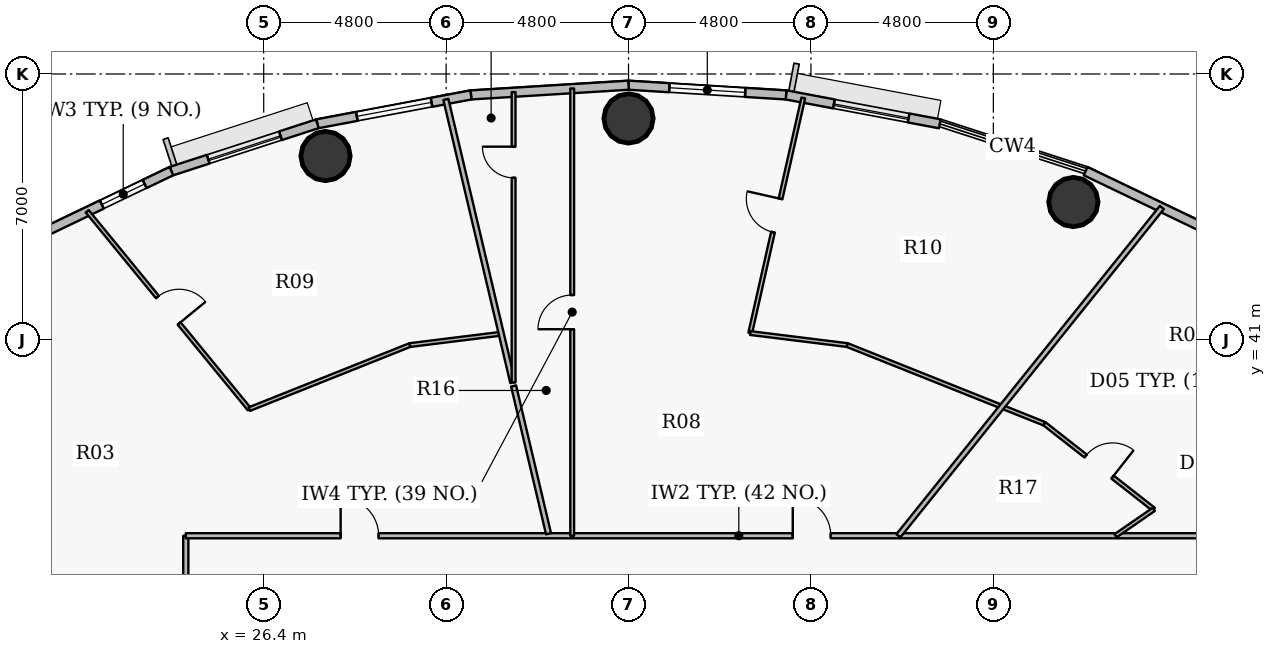
"""IFC4 building model, lengths in metres.
Left out: names, types, materials, properties, quantities, classifications, styles, units other than length and angle.
Written with IfcOpenShell. Run it as: python <this file> out.ifc"""

import sys

from ifc_helpers import new_model, si_unit, direction, frame, frame_2d, origin, origin_2d, place, context, subcontext, project, spatial, rectangle, hollow_circle, extrude, source, transform, mapped, element, fill, save


model = new_model("IFC4")
c1 = context("Model", 3, precision=1e-05, world=origin(), true_north=direction((0.0, 1.0)))
c2 = subcontext(c1, "Body", "Model", "MODEL_VIEW")
j1 = project(units=[si_unit("LENGTHUNIT", "METRE"), si_unit("PLANEANGLEUNIT", "RADIAN")], contexts=[c1])
p1 = place(None, origin())
s1 = spatial("IfcSite", under=j1, at=p1, CompositionType="ELEMENT")
p2 = place(p1, origin())
s2 = spatial("IfcBuilding", under=s1, at=p2, CompositionType="ELEMENT")
p3 = place(p2, frame((0.0, 0.0, 159.9)))
s3 = spatial("IfcBuildingStorey", under=s2, at=p3, CompositionType="ELEMENT", Elevation=159.9)
for number, where, z_axis, x_axis in (
    (1, (47.706, 44.631, 0.0), (0.0, 0.0, 1.0), (1.0, 0.0, 0.0)),
    (2, (36.0, 46.83, 0.0), (0.0, 0.0, 1.0), (1.0, 0.0, 0.0)),
    (3, (28.027, 45.841, 0.0), (0.0, 0.0, 1.0), (1.0, 0.0, 0.0)),
):
    element("IfcColumn", number, at=place(p3, frame(where, z_axis=z_axis, x_axis=x_axis)), inside=s3, PredefinedType="COLUMN", context=c2, shape_type="SweptSolid", body=[
        extrude(hollow_circle(Radius=0.65, WallThickness=0.04, at=origin_2d()), origin(), (0.0, 0.0, 1.0), 3.75),
    ])
p4 = place(p3, frame((48.03, 45.444, 0.0), z_axis=(0.0, 0.0, 1.0), x_axis=(0.901564733809, -0.432644231155, 0.0)))
e4 = element("IfcWall", 4, at=p4, inside=s3, PredefinedType="SOLIDWALL", context=c2, shape_type="SweptSolid", body=[
    extrude(rectangle(XDim=3.93, YDim=0.24, at=frame_2d((1.965, 0.0))), origin(), (0.0, 0.0, 1.0), 3.5),
])
p5 = place(p3, frame((40.146, 47.449, 0.0), z_axis=(0.0, 0.0, 1.0), x_axis=(0.982788108205, -0.184736391573, 0.0)))
e5 = element("IfcWall", 5, at=p5, inside=s3, PredefinedType="SOLIDWALL", context=c2, shape_type="SweptSolid", body=[
    extrude(rectangle(XDim=4.114, YDim=0.24, at=frame_2d((2.057, 0.0))), origin(), (0.0, 0.0, 1.0), 3.5),
])
p6 = place(p5, frame((1.281, 0.0, 0.9)))
e6 = element("IfcOpeningElement", 6, at=p6, cuts=e5, PredefinedType="OPENING", context=c2, shape_type="SweptSolid", body=[
    extrude(rectangle(XDim=2.0, YDim=1.75, at=origin_2d()), frame((1.0, 0.13, 0.875), z_axis=(0.0, -1.0, 0.0), x_axis=(1.0, 0.0, 0.0)), (0.0, 0.0, 1.0), 0.26),
])
p7 = place(p3, frame((36.0, 47.705, 0.0), z_axis=(0.0, 0.0, 1.0), x_axis=(0.998104600619, -0.061540281305, 0.0)))
e7 = element("IfcWall", 7, at=p7, inside=s3, PredefinedType="SOLIDWALL", context=c2, shape_type="SweptSolid", body=[
    extrude(rectangle(XDim=4.154, YDim=0.24, at=frame_2d((2.077, 0.0))), origin(), (0.0, 0.0, 1.0), 3.5),
])
p8 = place(p7, frame((1.077, 0.0, 0.9)))
e8 = element("IfcOpeningElement", 8, at=p8, cuts=e7, PredefinedType="OPENING", context=c2, shape_type="SweptSolid", body=[
    extrude(rectangle(XDim=2.0, YDim=1.75, at=origin_2d()), frame((1.0, 0.13, 0.875), z_axis=(0.0, -1.0, 0.0), x_axis=(1.0, 0.0, 0.0)), (0.0, 0.0, 1.0), 0.26),
])
p9 = place(p3, frame((31.854, 47.449, 0.0), z_axis=(0.0, 0.0, 1.0), x_axis=(0.998104600619, 0.061540281305, 0.0)))
e9 = element("IfcWall", 9, at=p9, inside=s3, PredefinedType="SOLIDWALL", context=c2, shape_type="SweptSolid", body=[
    extrude(rectangle(XDim=4.154, YDim=0.24, at=frame_2d((2.077, 0.0))), origin(), (0.0, 0.0, 1.0), 3.5),
])
p10 = place(p3, frame((27.811, 46.689, 0.0), z_axis=(0.0, 0.0, 1.0), x_axis=(0.982788108205, 0.184736391573, 0.0)))
e10 = element("IfcWall", 10, at=p10, inside=s3, PredefinedType="SOLIDWALL", context=c2, shape_type="SweptSolid", body=[
    extrude(rectangle(XDim=4.114, YDim=0.24, at=frame_2d((2.057, 0.0))), origin(), (0.0, 0.0, 1.0), 3.5),
])
p11 = place(p10, frame((1.057, 0.0, 0.9)))
e11 = element("IfcOpeningElement", 11, at=p11, cuts=e10, PredefinedType="OPENING", context=c2, shape_type="SweptSolid", body=[
    extrude(rectangle(XDim=2.0, YDim=1.75, at=origin_2d()), frame((1.0, 0.13, 0.875), z_axis=(0.0, -1.0, 0.0), x_axis=(1.0, 0.0, 0.0)), (0.0, 0.0, 1.0), 0.26),
])
p12 = place(p3, frame((23.97, 45.444, 0.0), z_axis=(0.0, 0.0, 1.0), x_axis=(0.951209870236, 0.30854462038, 0.0)))
e12 = element("IfcWall", 12, at=p12, inside=s3, PredefinedType="SOLIDWALL", context=c2, shape_type="SweptSolid", body=[
    extrude(rectangle(XDim=4.038, YDim=0.24, at=frame_2d((2.019, 0.0))), origin(), (0.0, 0.0, 1.0), 3.5),
])
p13 = place(p12, frame((1.019, 0.0, 0.9)))
e13 = element("IfcOpeningElement", 13, at=p13, cuts=e12, PredefinedType="OPENING", context=c2, shape_type="SweptSolid", body=[
    extrude(rectangle(XDim=2.0, YDim=1.75, at=origin_2d()), frame((1.0, 0.13, 0.875), z_axis=(0.0, -1.0, 0.0), x_axis=(1.0, 0.0, 0.0)), (0.0, 0.0, 1.0), 0.26),
])
p14 = place(p3, frame((20.427, 43.743, 0.0), z_axis=(0.0, 0.0, 1.0), x_axis=(0.901564733809, 0.432644231155, 0.0)))
e14 = element("IfcWall", 14, at=p14, inside=s3, PredefinedType="SOLIDWALL", context=c2, shape_type="SweptSolid", body=[
    extrude(rectangle(XDim=3.93, YDim=0.24, at=frame_2d((1.965, 0.0))), origin(), (0.0, 0.0, 1.0), 3.5),
])
p15 = place(p14, frame((1.9, 0.0, 0.9)))
e15 = element("IfcOpeningElement", 15, at=p15, cuts=e14, PredefinedType="OPENING", context=c2, shape_type="SweptSolid", body=[
    extrude(rectangle(XDim=1.25, YDim=1.65, at=origin_2d()), frame((0.625, 0.13, 0.825), z_axis=(0.0, -1.0, 0.0), x_axis=(1.0, 0.0, 0.0)), (0.0, 0.0, 1.0), 0.26),
])
p16 = place(p3, frame((13.229, 37.45, 0.0), z_axis=(0.0, 0.0, 1.0), x_axis=(0.908867611309, -0.417084721746, 0.0)))
e16 = element("IfcWall", 16, at=p16, inside=s3, PredefinedType="PARTITIONING", context=c2, shape_type="SweptSolid", body=[
    extrude(rectangle(XDim=12.237, YDim=0.135, at=frame_2d((6.118, 0.0))), origin(), (0.0, 0.0, 1.0), 2.935),
])
p17 = place(p3, frame((21.756, 44.387, 0.0), z_axis=(0.0, 0.0, 1.0), x_axis=(0.633727642201, -0.773556252325, 0.0)))
e17 = element("IfcWall", 17, at=p17, inside=s3, PredefinedType="PARTITIONING", context=c2, shape_type="SweptSolid", body=[
    extrude(rectangle(XDim=6.729, YDim=0.1, at=frame_2d((3.365, 0.0))), origin(), (0.0, 0.0, 1.0), 2.935),
])
p18 = place(p17, frame((2.915, 0.0, 0.0)))
e18 = element("IfcOpeningElement", 18, at=p18, cuts=e17, PredefinedType="OPENING", context=c2, shape_type="SweptSolid", body=[
    extrude(rectangle(XDim=0.9, YDim=2.1, at=origin_2d()), frame((0.45, 0.06, 1.05), z_axis=(0.0, -1.0, 0.0), x_axis=(1.0, 0.0, 0.0)), (0.0, 0.0, 1.0), 0.12),
])
p19 = place(p3, frame((24.35, 27.95, 0.0), z_axis=(0.0, 0.0, 1.0), x_axis=(0.0, 1.0, 0.0)))
e19 = element("IfcWall", 19, at=p19, inside=s3, PredefinedType="PARTITIONING", context=c2, shape_type="SweptSolid", body=[
    extrude(rectangle(XDim=7.9, YDim=0.135, at=frame_2d((3.95, 0.0))), origin(), (0.0, 0.0, 1.0), 2.935),
])
p20 = place(p3, frame((24.35, 35.85, 0.0), z_axis=(0.0, 0.0, 1.0), x_axis=(1.0, 0.0, 0.0)))
e20 = element("IfcWall", 20, at=p20, inside=s3, PredefinedType="PARTITIONING", context=c2, shape_type="SweptSolid", body=[
    extrude(rectangle(XDim=29.104, YDim=0.135, at=frame_2d((14.552, 0.0))), origin(), (0.0, 0.0, 1.0), 2.935),
])
p21 = place(p20, frame((15.972, 0.0, 0.0)))
e21 = element("IfcOpeningElement", 21, at=p21, cuts=e20, PredefinedType="OPENING", context=c2, shape_type="SweptSolid", body=[
    extrude(rectangle(XDim=1.0, YDim=2.15, at=origin_2d()), frame((0.5, 0.078, 1.075), z_axis=(0.0, -1.0, 0.0), x_axis=(1.0, 0.0, 0.0)), (0.0, 0.0, 1.0), 0.155),
])
p22 = place(p20, frame((4.074, 0.0, 0.0)))
e22 = element("IfcOpeningElement", 22, at=p22, cuts=e20, PredefinedType="OPENING", context=c2, shape_type="SweptSolid", body=[
    extrude(rectangle(XDim=1.0, YDim=2.15, at=origin_2d()), frame((0.5, 0.078, 1.075), z_axis=(0.0, -1.0, 0.0), x_axis=(1.0, 0.0, 0.0)), (0.0, 0.0, 1.0), 0.155),
])
p23 = place(p3, frame((26.021, 39.181, 0.0), z_axis=(0.0, 0.0, 1.0), x_axis=(0.928787254853, 0.37061332305, 0.0)))
e23 = element("IfcWall", 23, at=p23, inside=s3, PredefinedType="PARTITIONING", context=c2, shape_type="SweptSolid", body=[
    extrude(rectangle(XDim=4.549, YDim=0.1, at=frame_2d((2.275, 0.0))), origin(), (0.0, 0.0, 1.0), 2.935),
])
p24 = place(p3, frame((30.246, 40.867, 0.0), z_axis=(0.0, 0.0, 1.0), x_axis=(0.99240598239, 0.123005553192, 0.0)))
e24 = element("IfcWall", 24, at=p24, inside=s3, PredefinedType="PARTITIONING", context=c2, shape_type="SweptSolid", body=[
    extrude(rectangle(XDim=2.423, YDim=0.1, at=frame_2d((1.212, 0.0))), origin(), (0.0, 0.0, 1.0), 2.935),
])
p25 = place(p3, frame((31.194, 47.33, 0.0), z_axis=(0.0, 0.0, 1.0), x_axis=(0.230064999041, -0.973175264902, 0.0)))
e25 = element("IfcWall", 25, at=p25, inside=s3, PredefinedType="PARTITIONING", context=c2, shape_type="SweptSolid", body=[
    extrude(rectangle(XDim=7.654, YDim=0.135, at=frame_2d((3.827, 0.0))), origin(), (0.0, 0.0, 1.0), 2.935),
])
p26 = place(p3, frame((32.976, 39.792, 0.0), z_axis=(0.0, 0.0, 1.0), x_axis=(0.230050705958, -0.973178643769, 0.0)))
e26 = element("IfcWall", 26, at=p26, inside=s3, PredefinedType="PARTITIONING", context=c2, shape_type="SweptSolid", body=[
    extrude(rectangle(XDim=3.996, YDim=0.135, at=frame_2d((1.998, 0.0))), origin(), (0.0, 0.0, 1.0), 3.5),
])
p27 = place(p3, frame((32.976, 39.884, 0.0), z_axis=(0.0, 0.0, 1.0), x_axis=(0.0, 1.0, 0.0)))
e27 = element("IfcWall", 27, at=p27, inside=s3, PredefinedType="PARTITIONING", context=c2, shape_type="SweptSolid", body=[
    extrude(rectangle(XDim=7.64, YDim=0.1, at=frame_2d((3.82, 0.0))), origin(), (0.0, 0.0, 1.0), 2.935),
])
p28 = place(p27, frame((5.384, 0.0, 0.0)))
e28 = element("IfcOpeningElement", 28, at=p28, cuts=e27, PredefinedType="OPENING", context=c2, shape_type="SweptSolid", body=[
    extrude(rectangle(XDim=0.82, YDim=2.1, at=origin_2d()), frame((0.41, 0.06, 1.05), z_axis=(0.0, -1.0, 0.0), x_axis=(1.0, 0.0, 0.0)), (0.0, 0.0, 1.0), 0.12),
])
p29 = place(p3, frame((34.518, 35.85, 0.0), z_axis=(0.0, 0.0, 1.0), x_axis=(0.0, 1.0, 0.0)))
e29 = element("IfcWall", 29, at=p29, inside=s3, PredefinedType="PARTITIONING", context=c2, shape_type="SweptSolid", body=[
    extrude(rectangle(XDim=11.769, YDim=0.1, at=frame_2d((5.884, 0.0))), origin(), (0.0, 0.0, 1.0), 2.935),
])
p30 = place(p29, frame((5.434, 0.0, 0.0)))
e30 = element("IfcOpeningElement", 30, at=p30, cuts=e29, PredefinedType="OPENING", context=c2, shape_type="SweptSolid", body=[
    extrude(rectangle(XDim=0.9, YDim=2.1, at=origin_2d()), frame((0.45, 0.06, 1.05), z_axis=(0.0, -1.0, 0.0), x_axis=(1.0, 0.0, 0.0)), (0.0, 0.0, 1.0), 0.12),
])
p31 = place(p3, frame((39.202, 41.184, 0.0), z_axis=(0.0, 0.0, 1.0), x_axis=(0.220223056883, 0.975449540067, 0.0)))
e31 = element("IfcWall", 31, at=p31, inside=s3, PredefinedType="PARTITIONING", context=c2, shape_type="SweptSolid", body=[
    extrude(rectangle(XDim=6.341, YDim=0.1, at=frame_2d((3.171, 0.0))), origin(), (0.0, 0.0, 1.0), 2.935),
])
p32 = place(p31, frame((2.721, 0.0, 0.0)))
e32 = element("IfcOpeningElement", 32, at=p32, cuts=e31, PredefinedType="OPENING", context=c2, shape_type="SweptSolid", body=[
    extrude(rectangle(XDim=0.9, YDim=2.1, at=origin_2d()), frame((0.45, 0.06, 1.05), z_axis=(0.0, -1.0, 0.0), x_axis=(1.0, 0.0, 0.0)), (0.0, 0.0, 1.0), 0.12),
])
p33 = place(p3, frame((39.202, 41.184, 0.0), z_axis=(0.0, 0.0, 1.0), x_axis=(0.992398655735, -0.123064650065, 0.0)))
e33 = element("IfcWall", 33, at=p33, inside=s3, PredefinedType="PARTITIONING", context=c2, shape_type="SweptSolid", body=[
    extrude(rectangle(XDim=2.571, YDim=0.1, at=frame_2d((1.286, 0.0))), origin(), (0.0, 0.0, 1.0), 3.5),
])
p34 = place(p3, frame((41.754, 40.867, 0.0), z_axis=(0.0, 0.0, 1.0), x_axis=(0.928789673623, -0.370607261359, 0.0)))
e34 = element("IfcWall", 34, at=p34, inside=s3, PredefinedType="PARTITIONING", context=c2, shape_type="SweptSolid", body=[
    extrude(rectangle(XDim=5.589, YDim=0.1, at=frame_2d((2.794, 0.0))), origin(), (0.0, 0.0, 1.0), 2.935),
])
p35 = place(p3, frame((43.102, 35.85, 0.0), z_axis=(0.0, 0.0, 1.0), x_axis=(0.62588794771, 0.779912993168, 0.0)))
e35 = element("IfcWall", 35, at=p35, inside=s3, PredefinedType="PARTITIONING", context=c2, shape_type="SweptSolid", body=[
    extrude(rectangle(XDim=11.075, YDim=0.135, at=frame_2d((5.538, 0.0))), origin(), (0.0, 0.0, 1.0), 2.935),
])
p36 = place(p3, frame((46.71, 30.48, 0.0), z_axis=(0.0, 0.0, 1.0), x_axis=(0.951054665008, 0.309022691992, 0.0)))
e36 = element("IfcWall", 36, at=p36, inside=s3, PredefinedType="PARTITIONING", context=c2, shape_type="SweptSolid", body=[
    extrude(rectangle(XDim=14.372, YDim=0.135, at=frame_2d((7.186, 0.0))), origin(), (0.0, 0.0, 1.0), 2.935),
])
p37 = place(p3, frame((46.945, 38.796, 0.0), z_axis=(0.0, 0.0, 1.0), x_axis=(0.787307530322, -0.616560502058, 0.0)))
e37 = element("IfcWall", 37, at=p37, inside=s3, PredefinedType="PARTITIONING", context=c2, shape_type="SweptSolid", body=[
    extrude(rectangle(XDim=3.653, YDim=0.1, at=frame_2d((1.827, 0.0))), origin(), (0.0, 0.0, 1.0), 2.935),
])
p38 = place(p37, frame((1.377, 0.0, 0.0)))
e38 = element("IfcOpeningElement", 38, at=p38, cuts=e37, PredefinedType="OPENING", context=c2, shape_type="SweptSolid", body=[
    extrude(rectangle(XDim=0.9, YDim=2.1, at=origin_2d()), frame((0.45, 0.06, 1.05), z_axis=(0.0, -1.0, 0.0), x_axis=(1.0, 0.0, 0.0)), (0.0, 0.0, 1.0), 0.12),
])
p39 = place(p3, frame((48.816, 35.85, 0.0), z_axis=(0.0, 0.0, 1.0), x_axis=(0.822832340307, 0.568284206841, 0.0)))
e39 = element("IfcWall", 39, at=p39, inside=s3, PredefinedType="PARTITIONING", context=c2, shape_type="SweptSolid", body=[
    extrude(rectangle(XDim=1.221, YDim=0.1, at=frame_2d((0.61, 0.0))), origin(), (0.0, 0.0, 1.0), 3.5),
])
m1 = source(origin(), c2, "Body", "SweptSolid", [
    extrude(rectangle(XDim=2.0, YDim=1.75, at=origin_2d()), frame((1.0, 0.03, 0.875), z_axis=(0.0, -1.0, 0.0), x_axis=(1.0, 0.0, 0.0)), (0.0, 0.0, 1.0), 0.06),
])
p40 = place(p6, origin())
e40 = element("IfcWindow", 40, at=p40, inside=s3, PartitioningType="DOUBLE_PANEL_VERTICAL", PredefinedType="WINDOW", context=c2, shape_type="MappedRepresentation", body=[
    mapped(m1, transform((0.0, 0.0, 0.0), x_axis=(1.0, 0.0, 0.0), y_axis=(0.0, 1.0, 0.0), z_axis=(0.0, 0.0, 1.0), scale=1.0)),
])
fill(e6, e40)
p41 = place(p8, origin())
e41 = element("IfcWindow", 41, at=p41, inside=s3, PartitioningType="DOUBLE_PANEL_VERTICAL", PredefinedType="WINDOW", context=c2, shape_type="MappedRepresentation", body=[
    mapped(m1, transform((0.0, 0.0, 0.0), x_axis=(1.0, 0.0, 0.0), y_axis=(0.0, 1.0, 0.0), z_axis=(0.0, 0.0, 1.0), scale=1.0)),
])
fill(e8, e41)
p42 = place(p11, origin())
e42 = element("IfcWindow", 42, at=p42, inside=s3, PartitioningType="DOUBLE_PANEL_VERTICAL", PredefinedType="WINDOW", context=c2, shape_type="MappedRepresentation", body=[
    mapped(m1, transform((0.0, 0.0, 0.0), x_axis=(1.0, 0.0, 0.0), y_axis=(0.0, 1.0, 0.0), z_axis=(0.0, 0.0, 1.0), scale=1.0)),
])
fill(e11, e42)
p43 = place(p13, origin())
e43 = element("IfcWindow", 43, at=p43, inside=s3, PartitioningType="DOUBLE_PANEL_VERTICAL", PredefinedType="WINDOW", context=c2, shape_type="MappedRepresentation", body=[
    mapped(m1, transform((0.0, 0.0, 0.0), x_axis=(1.0, 0.0, 0.0), y_axis=(0.0, 1.0, 0.0), z_axis=(0.0, 0.0, 1.0), scale=1.0)),
])
fill(e13, e43)
m2 = source(origin(), c2, "Body", "SweptSolid", [
    extrude(rectangle(XDim=1.25, YDim=1.65, at=origin_2d()), frame((0.625, 0.03, 0.825), z_axis=(0.0, -1.0, 0.0), x_axis=(1.0, 0.0, 0.0)), (0.0, 0.0, 1.0), 0.06),
])
p44 = place(p15, origin())
e44 = element("IfcWindow", 44, at=p44, inside=s3, PartitioningType="SINGLE_PANEL", PredefinedType="WINDOW", context=c2, shape_type="MappedRepresentation", body=[
    mapped(m2, transform((0.0, 0.0, 0.0), x_axis=(1.0, 0.0, 0.0), y_axis=(0.0, 1.0, 0.0), z_axis=(0.0, 0.0, 1.0), scale=1.0)),
])
fill(e15, e44)
m3 = source(origin(), c2, "Body", "SweptSolid", [
    extrude(rectangle(XDim=0.9, YDim=2.1, at=origin_2d()), frame((0.45, 0.025, 1.05), z_axis=(0.0, -1.0, 0.0), x_axis=(1.0, 0.0, 0.0)), (0.0, 0.0, 1.0), 0.05),
])
p45 = place(p38, origin())
e45 = element("IfcDoor", 45, at=p45, inside=s3, OperationType="SINGLE_SWING_RIGHT", PredefinedType="DOOR", context=c2, shape_type="MappedRepresentation", body=[
    mapped(m3, transform((0.0, 0.0, 0.0), x_axis=(1.0, 0.0, 0.0), y_axis=(0.0, 1.0, 0.0), z_axis=(0.0, 0.0, 1.0), scale=1.0)),
])
fill(e38, e45)
m4 = source(origin(), c2, "Body", "SweptSolid", [
    extrude(rectangle(XDim=1.0, YDim=2.15, at=origin_2d()), frame((0.5, 0.025, 1.075), z_axis=(0.0, -1.0, 0.0), x_axis=(1.0, 0.0, 0.0)), (0.0, 0.0, 1.0), 0.05),
])
p46 = place(p21, origin())
e46 = element("IfcDoor", 46, at=p46, inside=s3, OperationType="SINGLE_SWING_LEFT", PredefinedType="DOOR", context=c2, shape_type="MappedRepresentation", body=[
    mapped(m4, transform((0.0, 0.0, 0.0), x_axis=(1.0, 0.0, 0.0), y_axis=(0.0, 1.0, 0.0), z_axis=(0.0, 0.0, 1.0), scale=1.0)),
])
fill(e21, e46)
p47 = place(p32, origin())
e47 = element("IfcDoor", 47, at=p47, inside=s3, OperationType="SINGLE_SWING_RIGHT", PredefinedType="DOOR", context=c2, shape_type="MappedRepresentation", body=[
    mapped(m3, transform((0.0, 0.0, 0.0), x_axis=(1.0, 0.0, 0.0), y_axis=(0.0, 1.0, 0.0), z_axis=(0.0, 0.0, 1.0), scale=1.0)),
])
fill(e32, e47)
p48 = place(p30, origin())
e48 = element("IfcDoor", 48, at=p48, inside=s3, OperationType="SINGLE_SWING_LEFT", PredefinedType="DOOR", context=c2, shape_type="MappedRepresentation", body=[
    mapped(m3, transform((0.0, 0.0, 0.0), x_axis=(1.0, 0.0, 0.0), y_axis=(0.0, 1.0, 0.0), z_axis=(0.0, 0.0, 1.0), scale=1.0)),
])
fill(e30, e48)
m5 = source(origin(), c2, "Body", "SweptSolid", [
    extrude(rectangle(XDim=0.82, YDim=2.1, at=origin_2d()), frame((0.41, 0.025, 1.05), z_axis=(0.0, -1.0, 0.0), x_axis=(1.0, 0.0, 0.0)), (0.0, 0.0, 1.0), 0.05),
])
p49 = place(p28, origin())
e49 = element("IfcDoor", 49, at=p49, inside=s3, OperationType="SINGLE_SWING_RIGHT", PredefinedType="DOOR", context=c2, shape_type="MappedRepresentation", body=[
    mapped(m5, transform((0.0, 0.0, 0.0), x_axis=(1.0, 0.0, 0.0), y_axis=(0.0, 1.0, 0.0), z_axis=(0.0, 0.0, 1.0), scale=1.0)),
])
fill(e28, e49)
p50 = place(p22, origin())
e50 = element("IfcDoor", 50, at=p50, inside=s3, OperationType="SINGLE_SWING_LEFT", PredefinedType="DOOR", context=c2, shape_type="MappedRepresentation", body=[
    mapped(m4, transform((0.0, 0.0, 0.0), x_axis=(1.0, 0.0, 0.0), y_axis=(0.0, 1.0, 0.0), z_axis=(0.0, 0.0, 1.0), scale=1.0)),
])
fill(e22, e50)
p51 = place(p18, origin())
e51 = element("IfcDoor", 51, at=p51, inside=s3, OperationType="SINGLE_SWING_RIGHT", PredefinedType="DOOR", context=c2, shape_type="MappedRepresentation", body=[
    mapped(m3, transform((0.0, 0.0, 0.0), x_axis=(1.0, 0.0, 0.0), y_axis=(0.0, 1.0, 0.0), z_axis=(0.0, 0.0, 1.0), scale=1.0)),
])
fill(e18, e51)
save(model, sys.argv[1])
